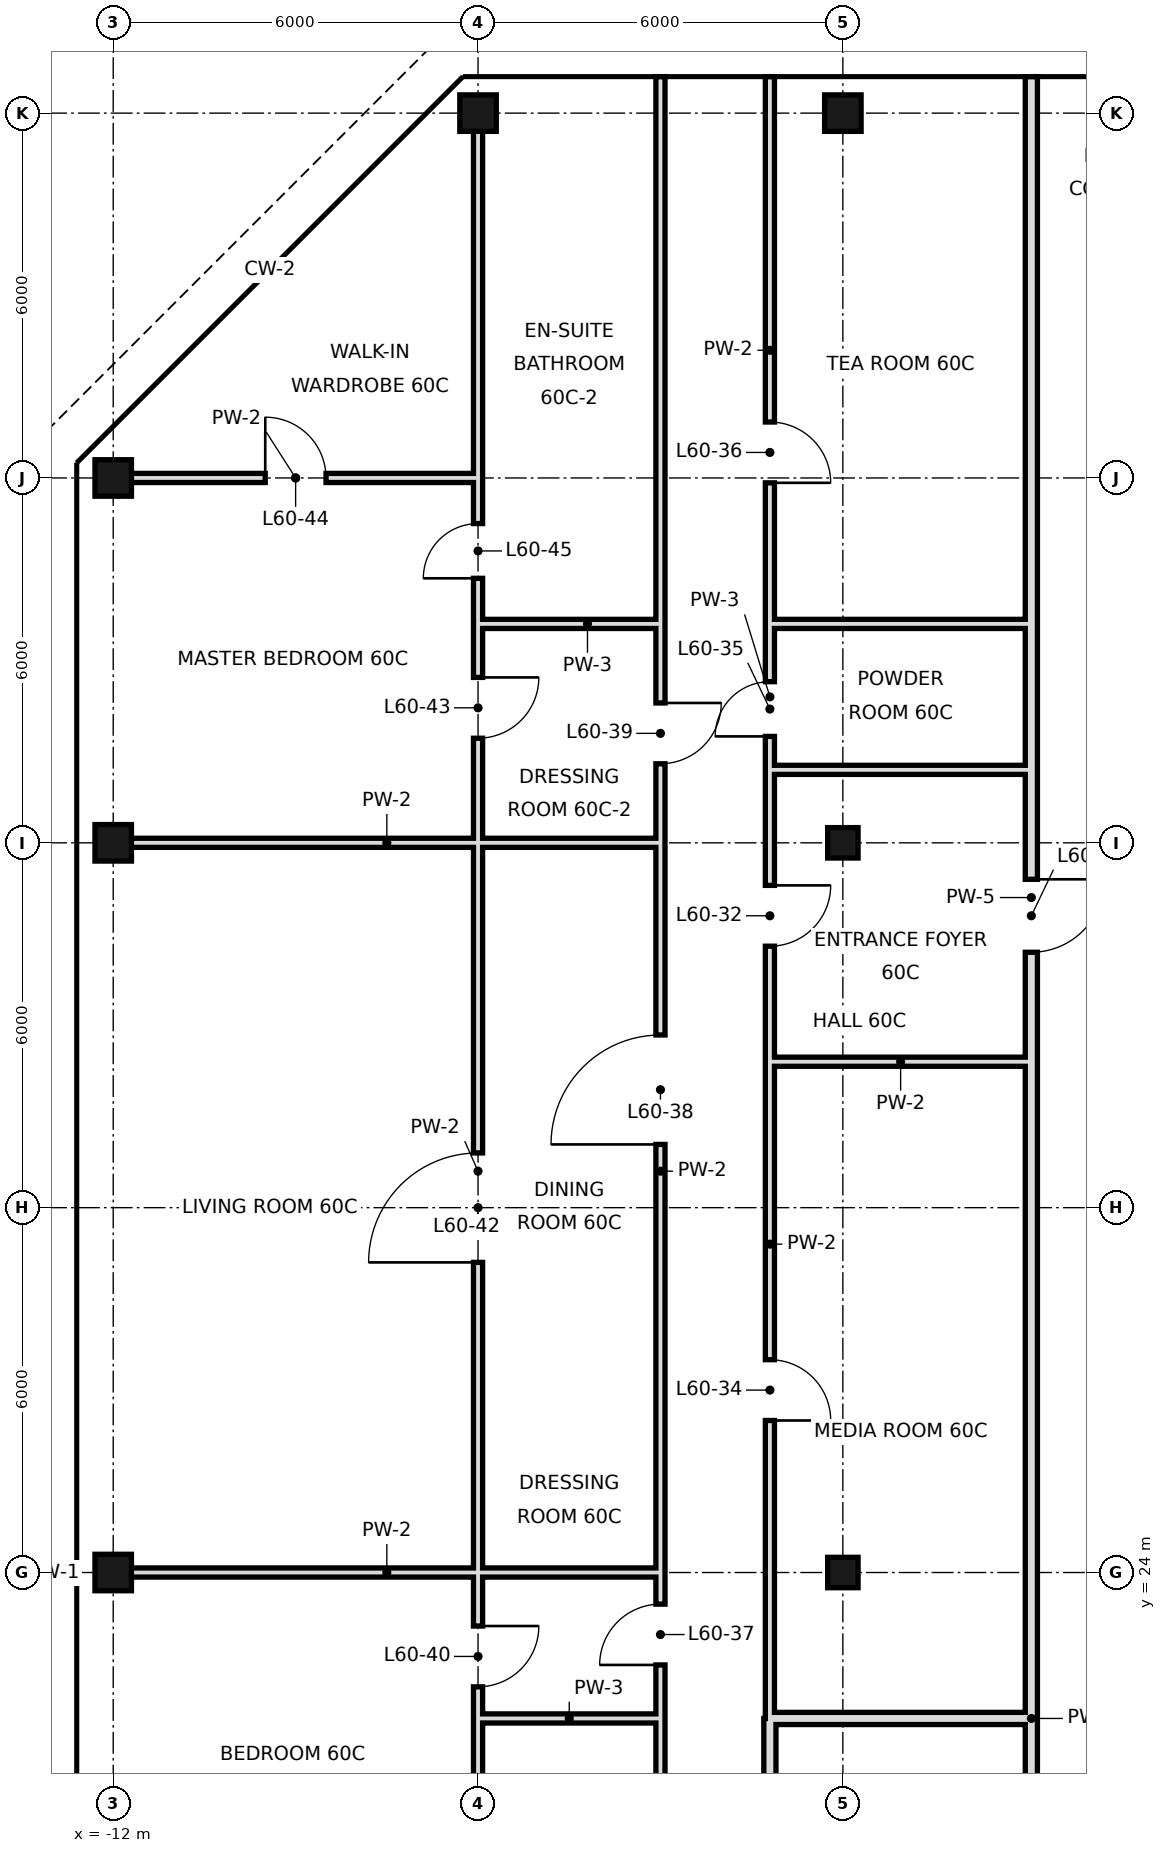
"""IFC4 building model, lengths in metres.
Left out: names, types, materials, properties, quantities, classifications, styles, units other than length and angle.
Written with IfcOpenShell. Run it as: python <this file> out.ifc"""

import sys

from ifc_helpers import new_model, si_unit, direction, frame, frame_2d, origin, origin_2d, place, context, subcontext, project, spatial, rectangle, hollow_rectangle, extrude, element, fill, save


model = new_model("IFC4")
c1 = context("Model", 3, precision=1e-05, world=origin(), true_north=direction((0.0, 1.0)))
c2 = subcontext(c1, "Body", "Model", "MODEL_VIEW")
j1 = project(units=[si_unit("LENGTHUNIT", "METRE"), si_unit("PLANEANGLEUNIT", "RADIAN")], contexts=[c1])
p1 = place(None, origin())
s1 = spatial("IfcSite", under=j1, at=p1, CompositionType="ELEMENT")
p2 = place(p1, origin())
s2 = spatial("IfcBuilding", under=s1, at=p2, CompositionType="ELEMENT")
p3 = place(p2, frame((0.0, 0.0, 254.0)))
s3 = spatial("IfcBuildingStorey", under=s2, at=p3, CompositionType="ELEMENT", Elevation=254.0)
for number, where, z_axis, x_axis in (
    (1, (-12.0, 24.0, 0.0), (0.0, 0.0, 1.0), (1.0, 0.0, 0.0)),
    (2, (-12.0, 36.0, 0.0), (0.0, 0.0, 1.0), (1.0, 0.0, 0.0)),
    (3, (-12.0, 42.0, 0.0), (0.0, 0.0, 1.0), (1.0, 0.0, 0.0)),
    (4, (-6.0, 48.0, 0.0), (0.0, 0.0, 1.0), (1.0, 0.0, 0.0)),
):
    element("IfcColumn", number, at=place(p3, frame(where, z_axis=z_axis, x_axis=x_axis)), inside=s3, PredefinedType="COLUMN", context=c2, shape_type="SweptSolid", body=[
        extrude(hollow_rectangle(XDim=0.6, YDim=0.6, WallThickness=0.028, at=origin_2d()), origin(), (0.0, 0.0, 1.0), 3.6),
    ])
for number, where, z_axis, x_axis in (
    (5, (0.0, 24.0, 0.0), (0.0, 0.0, 1.0), (1.0, 0.0, 0.0)),
    (6, (0.0, 36.0, 0.0), (0.0, 0.0, 1.0), (1.0, 0.0, 0.0)),
):
    element("IfcColumn", number, at=place(p3, frame(where, z_axis=z_axis, x_axis=x_axis)), inside=s3, PredefinedType="COLUMN", context=c2, shape_type="SweptSolid", body=[
        extrude(hollow_rectangle(XDim=0.5, YDim=0.5, WallThickness=0.025, at=origin_2d()), origin(), (0.0, 0.0, 1.0), 3.6),
    ])
p4 = place(p3, frame((0.0, 48.0, 0.0), z_axis=(0.0, 0.0, 1.0), x_axis=(1.0, 0.0, 0.0)))
e7 = element("IfcColumn", 7, at=p4, inside=s3, PredefinedType="COLUMN", context=c2, shape_type="SweptSolid", body=[
    extrude(hollow_rectangle(XDim=0.6, YDim=0.6, WallThickness=0.028, at=origin_2d()), origin(), (0.0, 0.0, 1.0), 3.6),
])
p5 = place(p3, frame((-1.2, 18.0, 0.0), z_axis=(0.0, 0.0, 1.0), x_axis=(0.0, 1.0, 0.0)))
e8 = element("IfcWall", 8, at=p5, inside=s3, PredefinedType="SOLIDWALL", context=c2, shape_type="SweptSolid", body=[
    extrude(rectangle(XDim=3.6, YDim=0.2, at=frame_2d((1.8, 0.0))), origin(), (0.0, 0.0, 1.0), 2.68),
])
p6 = place(p5, frame((1.3, 0.0, 0.0)))
e9 = element("IfcOpeningElement", 9, at=p6, cuts=e8, PredefinedType="OPENING", context=c2, shape_type="SweptSolid", body=[
    extrude(rectangle(XDim=1.0, YDim=2.4, at=frame_2d((0.5, 1.2))), frame((0.0, 0.11, 0.0), z_axis=(0.0, -1.0, 0.0), x_axis=(1.0, 0.0, 0.0)), (0.0, 0.0, 1.0), 0.22),
])
p7 = place(p3, frame((-1.2, 21.6, 0.0), z_axis=(0.0, 0.0, 1.0), x_axis=(0.0, 1.0, 0.0)))
e10 = element("IfcWall", 10, at=p7, inside=s3, PredefinedType="PARTITIONING", context=c2, shape_type="SweptSolid", body=[
    extrude(rectangle(XDim=15.6, YDim=0.15, at=frame_2d((7.8, 0.0))), origin(), (0.0, 0.0, 1.0), 3.38),
])
p8 = place(p7, frame((12.7, 0.0, 0.0)))
e11 = element("IfcOpeningElement", 11, at=p8, cuts=e10, PredefinedType="OPENING", context=c2, shape_type="SweptSolid", body=[
    extrude(rectangle(XDim=1.0, YDim=2.4, at=frame_2d((0.5, 1.2))), frame((0.0, 0.085, 0.0), z_axis=(0.0, -1.0, 0.0), x_axis=(1.0, 0.0, 0.0)), (0.0, 0.0, 1.0), 0.17),
])
p9 = place(p7, frame((4.9, 0.0, 0.0)))
e12 = element("IfcOpeningElement", 12, at=p9, cuts=e10, PredefinedType="OPENING", context=c2, shape_type="SweptSolid", body=[
    extrude(rectangle(XDim=1.0, YDim=2.4, at=frame_2d((0.5, 1.2))), frame((0.0, 0.085, 0.0), z_axis=(0.0, -1.0, 0.0), x_axis=(1.0, 0.0, 0.0)), (0.0, 0.0, 1.0), 0.17),
])
p10 = place(p3, frame((-1.2, 39.6, 0.0), z_axis=(0.0, 0.0, 1.0), x_axis=(0.0, 1.0, 0.0)))
e13 = element("IfcWall", 13, at=p10, inside=s3, PredefinedType="PARTITIONING", context=c2, shape_type="SweptSolid", body=[
    extrude(rectangle(XDim=9.0, YDim=0.15, at=frame_2d((4.5, 0.0))), origin(), (0.0, 0.0, 1.0), 3.38),
])
p11 = place(p10, frame((2.32, 0.0, 0.0)))
e14 = element("IfcOpeningElement", 14, at=p11, cuts=e13, PredefinedType="OPENING", context=c2, shape_type="SweptSolid", body=[
    extrude(rectangle(XDim=1.0, YDim=2.4, at=frame_2d((0.5, 1.2))), frame((0.0, 0.085, 0.0), z_axis=(0.0, -1.0, 0.0), x_axis=(1.0, 0.0, 0.0)), (0.0, 0.0, 1.0), 0.17),
])
p12 = place(p3, frame((-1.2, 37.2, 0.0), z_axis=(0.0, 0.0, 1.0), x_axis=(0.0, 1.0, 0.0)))
e15 = element("IfcWall", 15, at=p12, inside=s3, PredefinedType="PARTITIONING", context=c2, shape_type="SweptSolid", body=[
    extrude(rectangle(XDim=2.4, YDim=0.15, at=frame_2d((1.2, 0.0))), origin(), (0.0, 0.0, 1.0), 3.38),
])
p13 = place(p12, frame((0.55, 0.0, 0.0)))
e16 = element("IfcOpeningElement", 16, at=p13, cuts=e15, PredefinedType="OPENING", context=c2, shape_type="SweptSolid", body=[
    extrude(rectangle(XDim=0.9, YDim=2.4, at=frame_2d((0.45, 1.2))), frame((0.0, 0.085, 0.0), z_axis=(0.0, -1.0, 0.0), x_axis=(1.0, 0.0, 0.0)), (0.0, 0.0, 1.0), 0.17),
])
p14 = place(p3, frame((-3.0, 21.6, 0.0), z_axis=(0.0, 0.0, 1.0), x_axis=(0.0, 1.0, 0.0)))
e17 = element("IfcWall", 17, at=p14, inside=s3, PredefinedType="PARTITIONING", context=c2, shape_type="SweptSolid", body=[
    extrude(rectangle(XDim=18.0, YDim=0.15, at=frame_2d((9.0, 0.0))), origin(), (0.0, 0.0, 1.0), 3.38),
])
p15 = place(p14, frame((0.88, 0.0, 0.0)))
e18 = element("IfcOpeningElement", 18, at=p15, cuts=e17, PredefinedType="OPENING", context=c2, shape_type="SweptSolid", body=[
    extrude(rectangle(XDim=1.0, YDim=2.4, at=frame_2d((0.5, 1.2))), frame((0.0, 0.085, 0.0), z_axis=(0.0, -1.0, 0.0), x_axis=(1.0, 0.0, 0.0)), (0.0, 0.0, 1.0), 0.17),
])
p16 = place(p14, frame((9.44, 0.0, 0.0)))
e19 = element("IfcOpeningElement", 19, at=p16, cuts=e17, PredefinedType="OPENING", context=c2, shape_type="SweptSolid", body=[
    extrude(rectangle(XDim=1.8, YDim=2.4, at=frame_2d((0.9, 1.2))), frame((0.0, 0.085, 0.0), z_axis=(0.0, -1.0, 0.0), x_axis=(1.0, 0.0, 0.0)), (0.0, 0.0, 1.0), 0.17),
])
p17 = place(p14, frame((15.7, 0.0, 0.0)))
e20 = element("IfcOpeningElement", 20, at=p17, cuts=e17, PredefinedType="OPENING", context=c2, shape_type="SweptSolid", body=[
    extrude(rectangle(XDim=1.0, YDim=2.4, at=frame_2d((0.5, 1.2))), frame((0.0, 0.085, 0.0), z_axis=(0.0, -1.0, 0.0), x_axis=(1.0, 0.0, 0.0)), (0.0, 0.0, 1.0), 0.17),
])
p18 = place(p3, frame((-3.0, 18.0, 0.0), z_axis=(0.0, 0.0, 1.0), x_axis=(0.0, 1.0, 0.0)))
e21 = element("IfcWall", 21, at=p18, inside=s3, PredefinedType="PARTITIONING", context=c2, shape_type="SweptSolid", body=[
    extrude(rectangle(XDim=3.6, YDim=0.15, at=frame_2d((1.8, 0.0))), origin(), (0.0, 0.0, 1.0), 3.38),
])
p19 = place(p3, frame((-3.0, 39.6, 0.0), z_axis=(0.0, 0.0, 1.0), x_axis=(0.0, 1.0, 0.0)))
e22 = element("IfcWall", 22, at=p19, inside=s3, PredefinedType="PARTITIONING", context=c2, shape_type="SweptSolid", body=[
    extrude(rectangle(XDim=9.0, YDim=0.15, at=frame_2d((4.5, 0.0))), origin(), (0.0, 0.0, 1.0), 3.38),
])
p20 = place(p3, frame((-6.0, 21.6, 0.0), z_axis=(0.0, 0.0, 1.0), x_axis=(0.0, 1.0, 0.0)))
e23 = element("IfcWall", 23, at=p20, inside=s3, PredefinedType="PARTITIONING", context=c2, shape_type="SweptSolid", body=[
    extrude(rectangle(XDim=18.0, YDim=0.15, at=frame_2d((9.0, 0.0))), origin(), (0.0, 0.0, 1.0), 3.38),
])
p21 = place(p20, frame((0.52, 0.0, 0.0)))
e24 = element("IfcOpeningElement", 24, at=p21, cuts=e23, PredefinedType="OPENING", context=c2, shape_type="SweptSolid", body=[
    extrude(rectangle(XDim=1.0, YDim=2.4, at=frame_2d((0.5, 1.2))), frame((0.0, 0.085, 0.0), z_axis=(0.0, -1.0, 0.0), x_axis=(1.0, 0.0, 0.0)), (0.0, 0.0, 1.0), 0.17),
])
p22 = place(p20, frame((7.5, 0.0, 0.0)))
e25 = element("IfcOpeningElement", 25, at=p22, cuts=e23, PredefinedType="OPENING", context=c2, shape_type="SweptSolid", body=[
    extrude(rectangle(XDim=1.8, YDim=2.4, at=frame_2d((0.9, 1.2))), frame((0.0, 0.085, 0.0), z_axis=(0.0, -1.0, 0.0), x_axis=(1.0, 0.0, 0.0)), (0.0, 0.0, 1.0), 0.17),
])
p23 = place(p20, frame((16.12, 0.0, 0.0)))
e26 = element("IfcOpeningElement", 26, at=p23, cuts=e23, PredefinedType="OPENING", context=c2, shape_type="SweptSolid", body=[
    extrude(rectangle(XDim=1.0, YDim=2.4, at=frame_2d((0.5, 1.2))), frame((0.0, 0.085, 0.0), z_axis=(0.0, -1.0, 0.0), x_axis=(1.0, 0.0, 0.0)), (0.0, 0.0, 1.0), 0.17),
])
p24 = place(p3, frame((-6.0, 18.0, 0.0), z_axis=(0.0, 0.0, 1.0), x_axis=(0.0, 1.0, 0.0)))
e27 = element("IfcWall", 27, at=p24, inside=s3, PredefinedType="PARTITIONING", context=c2, shape_type="SweptSolid", body=[
    extrude(rectangle(XDim=3.6, YDim=0.15, at=frame_2d((1.8, 0.0))), origin(), (0.0, 0.0, 1.0), 3.38),
])
p25 = place(p24, frame((0.91, 0.0, 0.0)))
e28 = element("IfcOpeningElement", 28, at=p25, cuts=e27, PredefinedType="OPENING", context=c2, shape_type="SweptSolid", body=[
    extrude(rectangle(XDim=0.9, YDim=2.4, at=frame_2d((0.45, 1.2))), frame((0.0, 0.085, 0.0), z_axis=(0.0, -1.0, 0.0), x_axis=(1.0, 0.0, 0.0)), (0.0, 0.0, 1.0), 0.17),
])
p26 = place(p3, frame((-6.0, 39.6, 0.0), z_axis=(0.0, 0.0, 1.0), x_axis=(0.0, 1.0, 0.0)))
e29 = element("IfcWall", 29, at=p26, inside=s3, PredefinedType="PARTITIONING", context=c2, shape_type="SweptSolid", body=[
    extrude(rectangle(XDim=8.4, YDim=0.15, at=frame_2d((4.2, 0.0))), origin(), (0.0, 0.0, 1.0), 3.38),
])
p27 = place(p26, frame((0.75, 0.0, 0.0)))
e30 = element("IfcOpeningElement", 30, at=p27, cuts=e29, PredefinedType="OPENING", context=c2, shape_type="SweptSolid", body=[
    extrude(rectangle(XDim=0.9, YDim=2.4, at=frame_2d((0.45, 1.2))), frame((0.0, 0.085, 0.0), z_axis=(0.0, -1.0, 0.0), x_axis=(1.0, 0.0, 0.0)), (0.0, 0.0, 1.0), 0.17),
])
p28 = place(p3, frame((3.1, 21.6, 0.0), z_axis=(0.0, 0.0, 1.0), x_axis=(0.0, 1.0, 0.0)))
e31 = element("IfcWall", 31, at=p28, inside=s3, PredefinedType="SOLIDWALL", context=c2, shape_type="SweptSolid", body=[
    extrude(rectangle(XDim=27.0, YDim=0.2, at=frame_2d((13.5, 0.0))), origin(), (0.0, 0.0, 1.0), 2.68),
])
p29 = place(p28, frame((12.6, 0.0, 0.0)))
e32 = element("IfcOpeningElement", 32, at=p29, cuts=e31, PredefinedType="OPENING", context=c2, shape_type="SweptSolid", body=[
    extrude(rectangle(XDim=1.2, YDim=2.4, at=frame_2d((0.6, 1.2))), frame((0.0, 0.11, 0.0), z_axis=(0.0, -1.0, 0.0), x_axis=(1.0, 0.0, 0.0)), (0.0, 0.0, 1.0), 0.22),
])
p30 = place(p3, frame((3.1, 18.0, 0.0), z_axis=(0.0, 0.0, 1.0), x_axis=(0.0, 1.0, 0.0)))
e33 = element("IfcWall", 33, at=p30, inside=s3, PredefinedType="SOLIDWALL", context=c2, shape_type="SweptSolid", body=[
    extrude(rectangle(XDim=3.6, YDim=0.2, at=frame_2d((1.8, 0.0))), origin(), (0.0, 0.0, 1.0), 2.93),
])
p31 = place(p3, frame((-1.2, 21.6, 0.0), z_axis=(0.0, 0.0, 1.0), x_axis=(1.0, 0.0, 0.0)))
e34 = element("IfcWall", 34, at=p31, inside=s3, PredefinedType="SOLIDWALL", context=c2, shape_type="SweptSolid", body=[
    extrude(rectangle(XDim=4.3, YDim=0.2, at=frame_2d((2.15, 0.0))), origin(), (0.0, 0.0, 1.0), 2.68),
])
p32 = place(p3, frame((-6.0, 21.6, 0.0), z_axis=(0.0, 0.0, 1.0), x_axis=(1.0, 0.0, 0.0)))
e35 = element("IfcWall", 35, at=p32, inside=s3, PredefinedType="PARTITIONING", context=c2, shape_type="SweptSolid", body=[
    extrude(rectangle(XDim=3.0, YDim=0.15, at=frame_2d((1.5, 0.0))), origin(), (0.0, 0.0, 1.0), 3.38),
])
p33 = place(p3, frame((-12.0, 24.0, 0.0), z_axis=(0.0, 0.0, 1.0), x_axis=(1.0, 0.0, 0.0)))
e36 = element("IfcWall", 36, at=p33, inside=s3, PredefinedType="PARTITIONING", context=c2, shape_type="SweptSolid", body=[
    extrude(rectangle(XDim=9.0, YDim=0.15, at=frame_2d((4.5, 0.0))), origin(), (0.0, 0.0, 1.0), 2.68),
])
p34 = place(p3, frame((-1.2, 32.4, 0.0), z_axis=(0.0, 0.0, 1.0), x_axis=(1.0, 0.0, 0.0)))
e37 = element("IfcWall", 37, at=p34, inside=s3, PredefinedType="PARTITIONING", context=c2, shape_type="SweptSolid", body=[
    extrude(rectangle(XDim=4.3, YDim=0.15, at=frame_2d((2.15, 0.0))), origin(), (0.0, 0.0, 1.0), 3.38),
])
p35 = place(p3, frame((-12.0, 36.0, 0.0), z_axis=(0.0, 0.0, 1.0), x_axis=(1.0, 0.0, 0.0)))
e38 = element("IfcWall", 38, at=p35, inside=s3, PredefinedType="PARTITIONING", context=c2, shape_type="SweptSolid", body=[
    extrude(rectangle(XDim=9.0, YDim=0.15, at=frame_2d((4.5, 0.0))), origin(), (0.0, 0.0, 1.0), 2.68),
])
p36 = place(p3, frame((-1.2, 37.2, 0.0), z_axis=(0.0, 0.0, 1.0), x_axis=(1.0, 0.0, 0.0)))
e39 = element("IfcWall", 39, at=p36, inside=s3, PredefinedType="PARTITIONING", context=c2, shape_type="SweptSolid", body=[
    extrude(rectangle(XDim=4.3, YDim=0.15, at=frame_2d((2.15, 0.0))), origin(), (0.0, 0.0, 1.0), 3.38),
])
p37 = place(p3, frame((-6.0, 39.6, 0.0), z_axis=(0.0, 0.0, 1.0), x_axis=(1.0, 0.0, 0.0)))
e40 = element("IfcWall", 40, at=p37, inside=s3, PredefinedType="PARTITIONING", context=c2, shape_type="SweptSolid", body=[
    extrude(rectangle(XDim=3.0, YDim=0.15, at=frame_2d((1.5, 0.0))), origin(), (0.0, 0.0, 1.0), 3.38),
])
p38 = place(p3, frame((-1.2, 39.6, 0.0), z_axis=(0.0, 0.0, 1.0), x_axis=(1.0, 0.0, 0.0)))
e41 = element("IfcWall", 41, at=p38, inside=s3, PredefinedType="PARTITIONING", context=c2, shape_type="SweptSolid", body=[
    extrude(rectangle(XDim=4.3, YDim=0.15, at=frame_2d((2.15, 0.0))), origin(), (0.0, 0.0, 1.0), 3.38),
])
p39 = place(p3, frame((-12.0, 42.0, 0.0), z_axis=(0.0, 0.0, 1.0), x_axis=(1.0, 0.0, 0.0)))
e42 = element("IfcWall", 42, at=p39, inside=s3, PredefinedType="PARTITIONING", context=c2, shape_type="SweptSolid", body=[
    extrude(rectangle(XDim=6.0, YDim=0.15, at=frame_2d((3.0, 0.0))), origin(), (0.0, 0.0, 1.0), 2.68),
])
p40 = place(p39, frame((2.5, 0.0, 0.0)))
e43 = element("IfcOpeningElement", 43, at=p40, cuts=e42, PredefinedType="OPENING", context=c2, shape_type="SweptSolid", body=[
    extrude(rectangle(XDim=1.0, YDim=2.4, at=frame_2d((0.5, 1.2))), frame((0.0, 0.085, 0.0), z_axis=(0.0, -1.0, 0.0), x_axis=(1.0, 0.0, 0.0)), (0.0, 0.0, 1.0), 0.17),
])
p41 = place(p8, origin())
e44 = element("IfcDoor", 44, at=p41, inside=s3, OperationType="SINGLE_SWING_RIGHT", PredefinedType="DOOR", context=c2, shape_type="SweptSolid", body=[
    extrude(rectangle(XDim=1.0, YDim=2.4, at=frame_2d((0.5, 1.2))), frame((0.0, 0.025, 0.0), z_axis=(0.0, -1.0, 0.0), x_axis=(1.0, 0.0, 0.0)), (0.0, 0.0, 1.0), 0.05),
])
fill(e11, e44)
p42 = place(p9, frame((1.0, 0.0, 0.0), z_axis=(0.0, 0.0, 1.0), x_axis=(-1.0, 0.0, 0.0)))
e45 = element("IfcDoor", 45, at=p42, inside=s3, OperationType="SINGLE_SWING_RIGHT", PredefinedType="DOOR", context=c2, shape_type="SweptSolid", body=[
    extrude(rectangle(XDim=1.0, YDim=2.4, at=frame_2d((0.5, 1.2))), frame((0.0, 0.025, 0.0), z_axis=(0.0, -1.0, 0.0), x_axis=(1.0, 0.0, 0.0)), (0.0, 0.0, 1.0), 0.05),
])
fill(e12, e45)
p43 = place(p13, origin())
e46 = element("IfcDoor", 46, at=p43, inside=s3, OperationType="SINGLE_SWING_LEFT", PredefinedType="DOOR", context=c2, shape_type="SweptSolid", body=[
    extrude(rectangle(XDim=0.9, YDim=2.4, at=frame_2d((0.45, 1.2))), frame((0.0, 0.025, 0.0), z_axis=(0.0, -1.0, 0.0), x_axis=(1.0, 0.0, 0.0)), (0.0, 0.0, 1.0), 0.05),
])
fill(e16, e46)
p44 = place(p11, frame((1.0, 0.0, 0.0), z_axis=(0.0, 0.0, 1.0), x_axis=(-1.0, 0.0, 0.0)))
e47 = element("IfcDoor", 47, at=p44, inside=s3, OperationType="SINGLE_SWING_RIGHT", PredefinedType="DOOR", context=c2, shape_type="SweptSolid", body=[
    extrude(rectangle(XDim=1.0, YDim=2.4, at=frame_2d((0.5, 1.2))), frame((0.0, 0.025, 0.0), z_axis=(0.0, -1.0, 0.0), x_axis=(1.0, 0.0, 0.0)), (0.0, 0.0, 1.0), 0.05),
])
fill(e14, e47)
p45 = place(p15, origin())
e48 = element("IfcDoor", 48, at=p45, inside=s3, OperationType="SINGLE_SWING_LEFT", PredefinedType="DOOR", context=c2, shape_type="SweptSolid", body=[
    extrude(rectangle(XDim=1.0, YDim=2.4, at=frame_2d((0.5, 1.2))), frame((0.0, 0.025, 0.0), z_axis=(0.0, -1.0, 0.0), x_axis=(1.0, 0.0, 0.0)), (0.0, 0.0, 1.0), 0.05),
])
fill(e18, e48)
p46 = place(p16, origin())
e49 = element("IfcDoor", 49, at=p46, inside=s3, OperationType="SINGLE_SWING_LEFT", PredefinedType="DOOR", context=c2, shape_type="SweptSolid", body=[
    extrude(rectangle(XDim=1.8, YDim=2.4, at=frame_2d((0.9, 1.2))), frame((0.0, 0.025, 0.0), z_axis=(0.0, -1.0, 0.0), x_axis=(1.0, 0.0, 0.0)), (0.0, 0.0, 1.0), 0.05),
])
fill(e19, e49)
p47 = place(p17, origin())
e50 = element("IfcDoor", 50, at=p47, inside=s3, OperationType="SINGLE_SWING_RIGHT", PredefinedType="DOOR", context=c2, shape_type="SweptSolid", body=[
    extrude(rectangle(XDim=1.0, YDim=2.4, at=frame_2d((0.5, 1.2))), frame((0.0, 0.025, 0.0), z_axis=(0.0, -1.0, 0.0), x_axis=(1.0, 0.0, 0.0)), (0.0, 0.0, 1.0), 0.05),
])
fill(e20, e50)
p48 = place(p21, origin())
e51 = element("IfcDoor", 51, at=p48, inside=s3, OperationType="SINGLE_SWING_RIGHT", PredefinedType="DOOR", context=c2, shape_type="SweptSolid", body=[
    extrude(rectangle(XDim=1.0, YDim=2.4, at=frame_2d((0.5, 1.2))), frame((0.0, 0.025, 0.0), z_axis=(0.0, -1.0, 0.0), x_axis=(1.0, 0.0, 0.0)), (0.0, 0.0, 1.0), 0.05),
])
fill(e24, e51)
p49 = place(p22, origin())
e52 = element("IfcDoor", 52, at=p49, inside=s3, OperationType="SINGLE_SWING_LEFT", PredefinedType="DOOR", context=c2, shape_type="SweptSolid", body=[
    extrude(rectangle(XDim=1.8, YDim=2.4, at=frame_2d((0.9, 1.2))), frame((0.0, 0.025, 0.0), z_axis=(0.0, -1.0, 0.0), x_axis=(1.0, 0.0, 0.0)), (0.0, 0.0, 1.0), 0.05),
])
fill(e25, e52)
p50 = place(p23, origin())
e53 = element("IfcDoor", 53, at=p50, inside=s3, OperationType="SINGLE_SWING_RIGHT", PredefinedType="DOOR", context=c2, shape_type="SweptSolid", body=[
    extrude(rectangle(XDim=1.0, YDim=2.4, at=frame_2d((0.5, 1.2))), frame((0.0, 0.025, 0.0), z_axis=(0.0, -1.0, 0.0), x_axis=(1.0, 0.0, 0.0)), (0.0, 0.0, 1.0), 0.05),
])
fill(e26, e53)
p51 = place(p40, origin())
e54 = element("IfcDoor", 54, at=p51, inside=s3, OperationType="SINGLE_SWING_LEFT", PredefinedType="DOOR", context=c2, shape_type="SweptSolid", body=[
    extrude(rectangle(XDim=1.0, YDim=2.4, at=frame_2d((0.5, 1.2))), frame((0.0, 0.025, 0.0), z_axis=(0.0, -1.0, 0.0), x_axis=(1.0, 0.0, 0.0)), (0.0, 0.0, 1.0), 0.05),
])
fill(e43, e54)
p52 = place(p27, origin())
e55 = element("IfcDoor", 55, at=p52, inside=s3, OperationType="SINGLE_SWING_LEFT", PredefinedType="DOOR", context=c2, shape_type="SweptSolid", body=[
    extrude(rectangle(XDim=0.9, YDim=2.4, at=frame_2d((0.45, 1.2))), frame((0.0, 0.025, 0.0), z_axis=(0.0, -1.0, 0.0), x_axis=(1.0, 0.0, 0.0)), (0.0, 0.0, 1.0), 0.05),
])
fill(e30, e55)
p53 = place(p29, origin())
e56 = element("IfcDoor", 56, at=p53, inside=s3, OperationType="SINGLE_SWING_RIGHT", PredefinedType="DOOR", context=c2, shape_type="SweptSolid", body=[
    extrude(rectangle(XDim=1.2, YDim=2.4, at=frame_2d((0.6, 1.2))), frame((0.0, 0.025, 0.0), z_axis=(0.0, -1.0, 0.0), x_axis=(1.0, 0.0, 0.0)), (0.0, 0.0, 1.0), 0.05),
])
fill(e32, e56)
save(model, sys.argv[1])
